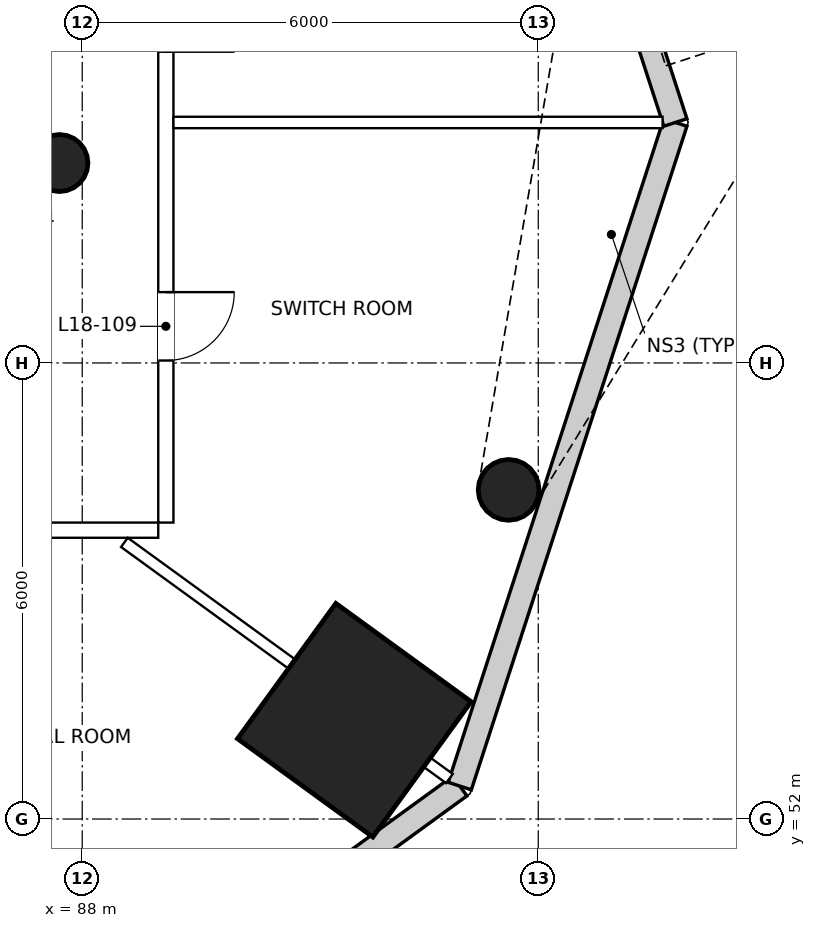
"""IFC4 building model, lengths in metres.
Left out: names, types, materials, properties, quantities, classifications, styles, units other than length and angle.
Written with IfcOpenShell. Run it as: python <this file> out.ifc"""

import sys

from ifc_helpers import new_model, si_unit, direction, frame, frame_2d, origin, origin_2d, place, context, subcontext, project, spatial, rectangle, circle, extrude, element, fill, save


model = new_model("IFC4")
c1 = context("Model", 3, precision=1e-05, world=origin(), true_north=direction((0.0, 1.0)))
c2 = subcontext(c1, "Body", "Model", "MODEL_VIEW")
j1 = project(units=[si_unit("LENGTHUNIT", "METRE"), si_unit("PLANEANGLEUNIT", "RADIAN")], contexts=[c1])
p1 = place(None, origin())
s1 = spatial("IfcSite", under=j1, at=p1, CompositionType="ELEMENT")
p2 = place(p1, origin())
s2 = spatial("IfcBuilding", under=s1, at=p2, CompositionType="ELEMENT")
p3 = place(p2, frame((0.0, 0.0, 85.8)))
s3 = spatial("IfcBuildingStorey", under=s2, at=p3, CompositionType="ELEMENT", Elevation=85.8)
p4 = place(p3, frame((91.58, 53.3, 0.0), z_axis=(0.0, 0.0, 1.0), x_axis=(0.809016994375, -0.587785252292, 0.0)))
e1 = element("IfcColumn", 1, at=p4, inside=s3, PredefinedType="COLUMN", context=c2, shape_type="SweptSolid", body=[
    extrude(rectangle(XDim=2.2, YDim=2.2, at=origin_2d()), origin(), (0.0, 0.0, 1.0), 5.0),
])
p5 = place(p3, frame((93.61, 56.33, 0.0), z_axis=(0.0, 0.0, 1.0), x_axis=(1.0, 0.0, 0.0)))
e2 = element("IfcColumn", 2, at=p5, inside=s3, PredefinedType="COLUMN", context=c2, shape_type="SweptSolid", body=[
    extrude(circle(Radius=0.4, at=origin_2d()), origin(), (0.0, 0.0, 1.0), 5.0),
])
p6 = place(p3, frame((87.7, 60.63, 0.0), z_axis=(0.0, 0.0, 1.0), x_axis=(1.0, 0.0, 0.0)))
e3 = element("IfcColumn", 3, at=p6, inside=s3, PredefinedType="COLUMN", context=c2, shape_type="SweptSolid", body=[
    extrude(circle(Radius=0.375, at=origin_2d()), origin(), (0.0, 0.0, 1.0), 5.0),
])
p7 = place(p3, frame((74.676, 39.144, 0.0), z_axis=(0.0, 0.0, 1.0), x_axis=(0.809018497564, 0.587783183325, 0.0)))
e4 = element("IfcWall", 4, at=p7, inside=s3, PredefinedType="SOLIDWALL", context=c2, shape_type="SweptSolid", body=[
    extrude(rectangle(XDim=22.609, YDim=0.32, at=frame_2d((11.305, 0.0))), origin(), (0.0, 0.0, 1.0), 4.7),
])
p8 = place(p3, frame((92.967, 52.434, 0.0), z_axis=(0.0, 0.0, 1.0), x_axis=(0.309021723461, 0.951054979709, 0.0)))
e5 = element("IfcWall", 5, at=p8, inside=s3, PredefinedType="SOLIDWALL", context=c2, shape_type="SweptSolid", body=[
    extrude(rectangle(XDim=9.179, YDim=0.32, at=frame_2d((4.59, 0.0))), origin(), (0.0, 0.0, 1.0), 4.7),
])
p9 = place(p3, frame((95.804, 61.164, 0.0), z_axis=(0.0, 0.0, 1.0), x_axis=(-0.309015264684, 0.951057078304, 0.0)))
e6 = element("IfcWall", 6, at=p9, inside=s3, PredefinedType="SOLIDWALL", context=c2, shape_type="SweptSolid", body=[
    extrude(rectangle(XDim=22.298, YDim=0.32, at=frame_2d((11.149, 0.0))), origin(), (0.0, 0.0, 1.0), 4.7),
])
p10 = place(p3, frame((89.1, 63.85, 0.0), z_axis=(0.0, 0.0, 1.0), x_axis=(0.0, -1.0, 0.0)))
e7 = element("IfcWall", 7, at=p10, inside=s3, PredefinedType="PARTITIONING", context=c2, shape_type="SweptSolid", body=[
    extrude(rectangle(XDim=7.95, YDim=0.2, at=frame_2d((3.975, 0.0))), origin(), (0.0, 0.0, 1.0), 4.7),
])
p11 = place(p10, frame((4.918, 0.0, 0.0)))
e8 = element("IfcOpeningElement", 8, at=p11, cuts=e7, PredefinedType="OPENING", context=c2, shape_type="SweptSolid", body=[
    extrude(rectangle(XDim=0.9, YDim=2.1, at=frame_2d((0.45, 1.05))), frame((0.0, 0.11, 0.0), z_axis=(0.0, -1.0, 0.0), x_axis=(1.0, 0.0, 0.0)), (0.0, 0.0, 1.0), 0.22),
])
p12 = place(p10, frame((0.856, 0.0, 0.0)))
e9 = element("IfcOpeningElement", 9, at=p12, cuts=e7, PredefinedType="OPENING", context=c2, shape_type="SweptSolid", body=[
    extrude(rectangle(XDim=0.9, YDim=2.1, at=frame_2d((0.45, 1.05))), frame((0.0, 0.11, 0.0), z_axis=(0.0, -1.0, 0.0), x_axis=(1.0, 0.0, 0.0)), (0.0, 0.0, 1.0), 0.22),
])
p13 = place(p3, frame((89.0, 55.8, 0.0), z_axis=(0.0, 0.0, 1.0), x_axis=(-1.0, 0.0, 0.0)))
e10 = element("IfcWall", 10, at=p13, inside=s3, PredefinedType="PARTITIONING", context=c2, shape_type="SweptSolid", body=[
    extrude(rectangle(XDim=3.684, YDim=0.2, at=frame_2d((1.842, 0.0))), origin(), (0.0, 0.0, 1.0), 4.0),
])
p14 = place(p13, frame((1.741, 0.0, 0.0)))
e11 = element("IfcOpeningElement", 11, at=p14, cuts=e10, PredefinedType="OPENING", context=c2, shape_type="SweptSolid", body=[
    extrude(rectangle(XDim=0.9, YDim=2.1, at=frame_2d((0.45, 1.05))), frame((0.0, 0.11, 0.0), z_axis=(0.0, -1.0, 0.0), x_axis=(1.0, 0.0, 0.0)), (0.0, 0.0, 1.0), 0.22),
])
p15 = place(p3, frame((92.831, 52.532, 0.0), z_axis=(0.0, 0.0, 1.0), x_axis=(-0.809003648196, 0.587803621293, 0.0)))
e12 = element("IfcWall", 12, at=p15, inside=s3, PredefinedType="PARTITIONING", context=c2, shape_type="SweptSolid", body=[
    extrude(rectangle(XDim=5.286, YDim=0.15, at=frame_2d((2.643, 0.0))), origin(), (0.0, 0.0, 1.0), 3.7),
])
p16 = place(p3, frame((95.635, 61.164, 0.0), z_axis=(0.0, 0.0, 1.0), x_axis=(-1.0, 0.0, 0.0)))
e13 = element("IfcWall", 13, at=p16, inside=s3, PredefinedType="PARTITIONING", context=c2, shape_type="SweptSolid", body=[
    extrude(rectangle(XDim=6.436, YDim=0.15, at=frame_2d((3.218, 0.0))), origin(), (0.0, 0.0, 1.0), 4.2),
])
p17 = place(p11, origin())
e14 = element("IfcDoor", 14, at=p17, inside=s3, OperationType="SINGLE_SWING_LEFT", PredefinedType="DOOR", context=c2, shape_type="SweptSolid", body=[
    extrude(rectangle(XDim=0.9, YDim=2.1, at=frame_2d((0.45, 1.05))), frame((0.0, 0.025, 0.0), z_axis=(0.0, -1.0, 0.0), x_axis=(1.0, 0.0, 0.0)), (0.0, 0.0, 1.0), 0.05),
])
fill(e8, e14)
save(model, sys.argv[1])
